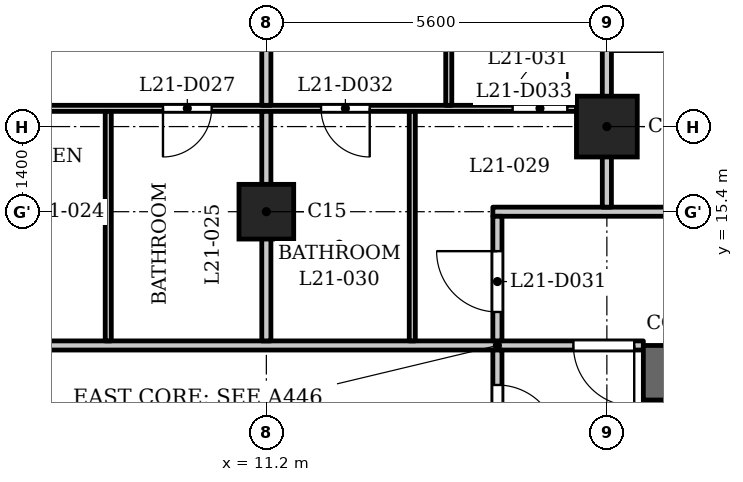
"""IFC4 building model, lengths in metres.
Left out: names, types, materials, properties, quantities, classifications, styles, units other than length and angle.
Written with IfcOpenShell. Run it as: python <this file> out.ifc"""

import sys

from ifc_helpers import new_model, si_unit, direction, frame, frame_2d, origin, origin_2d, place, context, subcontext, project, spatial, rectangle, extrude, element, fill, save


model = new_model("IFC4")
c1 = context("Model", 3, precision=1e-05, world=origin(), true_north=direction((0.0, 1.0)))
c2 = subcontext(c1, "Body", "Model", "MODEL_VIEW")
j1 = project(units=[si_unit("LENGTHUNIT", "METRE"), si_unit("PLANEANGLEUNIT", "RADIAN")], contexts=[c1])
p1 = place(None, origin())
s1 = spatial("IfcSite", under=j1, at=p1, CompositionType="ELEMENT")
p2 = place(p1, origin())
s2 = spatial("IfcBuilding", under=s1, at=p2, CompositionType="ELEMENT")
p3 = place(p2, frame((0.0, 0.0, 86.8)))
s3 = spatial("IfcBuildingStorey", under=s2, at=p3, CompositionType="ELEMENT", Elevation=86.8)
p4 = place(p3, frame((16.8, 16.8, 0.0), z_axis=(0.0, 0.0, 1.0), x_axis=(1.0, 0.0, 0.0)))
e1 = element("IfcColumn", 1, at=p4, inside=s3, PredefinedType="COLUMN", context=c2, shape_type="SweptSolid", body=[
    extrude(rectangle(XDim=1.0, YDim=1.0, at=origin_2d()), origin(), (0.0, 0.0, 1.0), 3.5),
])
p5 = place(p3, frame((11.2, 15.4, 0.0), z_axis=(0.0, 0.0, 1.0), x_axis=(1.0, 0.0, 0.0)))
e2 = element("IfcColumn", 2, at=p5, inside=s3, PredefinedType="COLUMN", context=c2, shape_type="SweptSolid", body=[
    extrude(rectangle(XDim=0.9, YDim=0.9, at=origin_2d()), origin(), (0.0, 0.0, 1.0), 3.5),
])
p6 = place(p3, frame((17.4, 12.75, 0.0), z_axis=(0.0, 0.0, 1.0), x_axis=(1.0, 0.0, 0.0)))
e3 = element("IfcWall", 3, at=p6, inside=s3, PredefinedType="SHEAR", context=c2, shape_type="SweptSolid", body=[
    extrude(rectangle(XDim=10.4, YDim=0.9, at=frame_2d((5.2, 0.0))), origin(), (0.0, 0.0, 1.0), 3.2),
])
p7 = place(p3, frame((17.6, -12.3, 0.0), z_axis=(0.0, 0.0, 1.0), x_axis=(0.0, 1.0, 0.0)))
e4 = element("IfcWall", 4, at=p7, inside=s3, PredefinedType="SHEAR", context=c2, shape_type="SweptSolid", body=[
    extrude(rectangle(XDim=24.6, YDim=0.4, at=frame_2d((12.3, 0.0))), origin(), (0.0, 0.0, 1.0), 3.2),
])
p8 = place(p7, frame((6.0, 0.0, 0.0)))
e5 = element("IfcOpeningElement", 5, at=p8, cuts=e4, PredefinedType="OPENING", context=c2, shape_type="SweptSolid", body=[
    extrude(rectangle(XDim=1.1, YDim=2.1, at=frame_2d((0.55, 1.05))), frame((0.0, 0.21, 0.0), z_axis=(0.0, -1.0, 0.0), x_axis=(1.0, 0.0, 0.0)), (0.0, 0.0, 1.0), 0.42),
])
p9 = place(p7, frame((8.4, 0.0, 0.0)))
e6 = element("IfcOpeningElement", 6, at=p9, cuts=e4, PredefinedType="OPENING", context=c2, shape_type="SweptSolid", body=[
    extrude(rectangle(XDim=1.1, YDim=2.1, at=frame_2d((0.55, 1.05))), frame((0.0, 0.21, 0.0), z_axis=(0.0, -1.0, 0.0), x_axis=(1.0, 0.0, 0.0)), (0.0, 0.0, 1.0), 0.42),
])
p10 = place(p7, frame((10.8, 0.0, 0.0)))
e7 = element("IfcOpeningElement", 7, at=p10, cuts=e4, PredefinedType="OPENING", context=c2, shape_type="SweptSolid", body=[
    extrude(rectangle(XDim=1.1, YDim=2.1, at=frame_2d((0.55, 1.05))), frame((0.0, 0.21, 0.0), z_axis=(0.0, -1.0, 0.0), x_axis=(1.0, 0.0, 0.0)), (0.0, 0.0, 1.0), 0.42),
])
p11 = place(p7, frame((16.75, 0.0, 0.0)))
e8 = element("IfcOpeningElement", 8, at=p11, cuts=e4, PredefinedType="OPENING", context=c2, shape_type="SweptSolid", body=[
    extrude(rectangle(XDim=0.9, YDim=2.1, at=frame_2d((0.45, 1.05))), frame((0.0, 0.21, 0.0), z_axis=(0.0, -1.0, 0.0), x_axis=(1.0, 0.0, 0.0)), (0.0, 0.0, 1.0), 0.42),
])
p12 = place(p7, frame((22.8, 0.0, 0.0)))
e9 = element("IfcOpeningElement", 9, at=p12, cuts=e4, PredefinedType="OPENING", context=c2, shape_type="SweptSolid", body=[
    extrude(rectangle(XDim=1.1, YDim=2.1, at=frame_2d((0.55, 1.05))), frame((0.0, 0.21, 0.0), z_axis=(0.0, -1.0, 0.0), x_axis=(1.0, 0.0, 0.0)), (0.0, 0.0, 1.0), 0.42),
])
p13 = place(p7, frame((0.7, 0.0, 0.0)))
e10 = element("IfcOpeningElement", 10, at=p13, cuts=e4, PredefinedType="OPENING", context=c2, shape_type="SweptSolid", body=[
    extrude(rectangle(XDim=1.1, YDim=2.1, at=frame_2d((0.55, 1.05))), frame((0.0, 0.21, 0.0), z_axis=(0.0, -1.0, 0.0), x_axis=(1.0, 0.0, 0.0)), (0.0, 0.0, 1.0), 0.42),
])
p14 = place(p7, frame((12.775, 0.0, 0.0)))
e11 = element("IfcOpeningElement", 11, at=p14, cuts=e4, PredefinedType="OPENING", context=c2, shape_type="SweptSolid", body=[
    extrude(rectangle(XDim=1.8, YDim=2.1, at=frame_2d((0.9, 1.05))), frame((0.0, 0.21, 0.0), z_axis=(0.0, -1.0, 0.0), x_axis=(1.0, 0.0, 0.0)), (0.0, 0.0, 1.0), 0.42),
])
p15 = place(p3, frame((-17.4, 13.2, 0.0), z_axis=(0.0, 0.0, 1.0), x_axis=(1.0, 0.0, 0.0)))
e12 = element("IfcWall", 12, at=p15, inside=s3, PredefinedType="PARTITIONING", context=c2, shape_type="SweptSolid", body=[
    extrude(rectangle(XDim=34.8, YDim=0.15, at=frame_2d((17.4, 0.0))), origin(), (0.0, 0.0, 1.0), 3.2),
])
p16 = place(p15, frame((0.25, 0.0, 0.0)))
e13 = element("IfcOpeningElement", 13, at=p16, cuts=e12, PredefinedType="OPENING", context=c2, shape_type="SweptSolid", body=[
    extrude(rectangle(XDim=1.0, YDim=2.1, at=frame_2d((0.5, 1.05))), frame((0.0, 0.085, 0.0), z_axis=(0.0, -1.0, 0.0), x_axis=(1.0, 0.0, 0.0)), (0.0, 0.0, 1.0), 0.17),
])
p17 = place(p15, frame((33.65, 0.0, 0.0)))
e14 = element("IfcOpeningElement", 14, at=p17, cuts=e12, PredefinedType="OPENING", context=c2, shape_type="SweptSolid", body=[
    extrude(rectangle(XDim=1.0, YDim=2.1, at=frame_2d((0.5, 1.05))), frame((0.0, 0.085, 0.0), z_axis=(0.0, -1.0, 0.0), x_axis=(1.0, 0.0, 0.0)), (0.0, 0.0, 1.0), 0.17),
])
p18 = place(p15, frame((15.75, 0.0, 0.0)))
e15 = element("IfcOpeningElement", 15, at=p18, cuts=e12, PredefinedType="OPENING", context=c2, shape_type="SweptSolid", body=[
    extrude(rectangle(XDim=1.0, YDim=2.1, at=frame_2d((0.5, 1.05))), frame((0.0, 0.085, 0.0), z_axis=(0.0, -1.0, 0.0), x_axis=(1.0, 0.0, 0.0)), (0.0, 0.0, 1.0), 0.17),
])
p19 = place(p15, frame((21.35, 0.0, 0.0)))
e16 = element("IfcOpeningElement", 16, at=p19, cuts=e12, PredefinedType="OPENING", context=c2, shape_type="SweptSolid", body=[
    extrude(rectangle(XDim=1.0, YDim=2.1, at=frame_2d((0.5, 1.05))), frame((0.0, 0.085, 0.0), z_axis=(0.0, -1.0, 0.0), x_axis=(1.0, 0.0, 0.0)), (0.0, 0.0, 1.0), 0.17),
])
p20 = place(p3, frame((14.925, 15.4, 0.0), z_axis=(0.0, 0.0, 1.0), x_axis=(1.0, 0.0, 0.0)))
e17 = element("IfcWall", 17, at=p20, inside=s3, PredefinedType="PARTITIONING", context=c2, shape_type="SweptSolid", body=[
    extrude(rectangle(XDim=12.559, YDim=0.15, at=frame_2d((6.279, 0.0))), origin(), (0.0, 0.0, 1.0), 3.2),
])
p21 = place(p20, frame((5.825, 0.0, 0.0)))
e18 = element("IfcOpeningElement", 18, at=p21, cuts=e17, PredefinedType="OPENING", context=c2, shape_type="SweptSolid", body=[
    extrude(rectangle(XDim=1.0, YDim=2.1, at=frame_2d((0.5, 1.05))), frame((0.0, 0.085, 0.0), z_axis=(0.0, -1.0, 0.0), x_axis=(1.0, 0.0, 0.0)), (0.0, 0.0, 1.0), 0.17),
])
p22 = place(p3, frame((-16.725, 17.1, 0.0), z_axis=(0.0, 0.0, 1.0), x_axis=(1.0, 0.0, 0.0)))
e19 = element("IfcWall", 19, at=p22, inside=s3, PredefinedType="PARTITIONING", context=c2, shape_type="SweptSolid", body=[
    extrude(rectangle(XDim=33.45, YDim=0.1, at=frame_2d((16.725, 0.0))), origin(), (0.0, 0.0, 1.0), 3.2),
])
p23 = place(p22, frame((3.925, 0.0, 0.0)))
e20 = element("IfcOpeningElement", 20, at=p23, cuts=e19, PredefinedType="OPENING", context=c2, shape_type="SweptSolid", body=[
    extrude(rectangle(XDim=0.8, YDim=2.1, at=frame_2d((0.4, 1.05))), frame((0.0, 0.06, 0.0), z_axis=(0.0, -1.0, 0.0), x_axis=(1.0, 0.0, 0.0)), (0.0, 0.0, 1.0), 0.12),
])
p24 = place(p22, frame((0.975, 0.0, 0.0)))
e21 = element("IfcOpeningElement", 21, at=p24, cuts=e19, PredefinedType="OPENING", context=c2, shape_type="SweptSolid", body=[
    extrude(rectangle(XDim=0.9, YDim=2.1, at=frame_2d((0.45, 1.05))), frame((0.0, 0.06, 0.0), z_axis=(0.0, -1.0, 0.0), x_axis=(1.0, 0.0, 0.0)), (0.0, 0.0, 1.0), 0.12),
])
p25 = place(p22, frame((6.425, 0.0, 0.0)))
e22 = element("IfcOpeningElement", 22, at=p25, cuts=e19, PredefinedType="OPENING", context=c2, shape_type="SweptSolid", body=[
    extrude(rectangle(XDim=0.8, YDim=2.1, at=frame_2d((0.4, 1.05))), frame((0.0, 0.06, 0.0), z_axis=(0.0, -1.0, 0.0), x_axis=(1.0, 0.0, 0.0)), (0.0, 0.0, 1.0), 0.12),
])
p26 = place(p22, frame((8.825, 0.0, 0.0)))
e23 = element("IfcOpeningElement", 23, at=p26, cuts=e19, PredefinedType="OPENING", context=c2, shape_type="SweptSolid", body=[
    extrude(rectangle(XDim=0.9, YDim=2.1, at=frame_2d((0.45, 1.05))), frame((0.0, 0.06, 0.0), z_axis=(0.0, -1.0, 0.0), x_axis=(1.0, 0.0, 0.0)), (0.0, 0.0, 1.0), 0.12),
])
p27 = place(p22, frame((12.375, 0.0, 0.0)))
e24 = element("IfcOpeningElement", 24, at=p27, cuts=e19, PredefinedType="OPENING", context=c2, shape_type="SweptSolid", body=[
    extrude(rectangle(XDim=0.9, YDim=2.1, at=frame_2d((0.45, 1.05))), frame((0.0, 0.06, 0.0), z_axis=(0.0, -1.0, 0.0), x_axis=(1.0, 0.0, 0.0)), (0.0, 0.0, 1.0), 0.12),
])
p28 = place(p22, frame((14.425, 0.0, 0.0)))
e25 = element("IfcOpeningElement", 25, at=p28, cuts=e19, PredefinedType="OPENING", context=c2, shape_type="SweptSolid", body=[
    extrude(rectangle(XDim=0.9, YDim=2.1, at=frame_2d((0.45, 1.05))), frame((0.0, 0.06, 0.0), z_axis=(0.0, -1.0, 0.0), x_axis=(1.0, 0.0, 0.0)), (0.0, 0.0, 1.0), 0.12),
])
p29 = place(p22, frame((26.225, 0.0, 0.0)))
e26 = element("IfcOpeningElement", 26, at=p29, cuts=e19, PredefinedType="OPENING", context=c2, shape_type="SweptSolid", body=[
    extrude(rectangle(XDim=0.8, YDim=2.1, at=frame_2d((0.4, 1.05))), frame((0.0, 0.06, 0.0), z_axis=(0.0, -1.0, 0.0), x_axis=(1.0, 0.0, 0.0)), (0.0, 0.0, 1.0), 0.12),
])
p30 = place(p22, frame((23.025, 0.0, 0.0)))
e27 = element("IfcOpeningElement", 27, at=p30, cuts=e19, PredefinedType="OPENING", context=c2, shape_type="SweptSolid", body=[
    extrude(rectangle(XDim=0.9, YDim=2.1, at=frame_2d((0.45, 1.05))), frame((0.0, 0.06, 0.0), z_axis=(0.0, -1.0, 0.0), x_axis=(1.0, 0.0, 0.0)), (0.0, 0.0, 1.0), 0.12),
])
p31 = place(p22, frame((17.775, 0.0, 0.0)))
e28 = element("IfcOpeningElement", 28, at=p31, cuts=e19, PredefinedType="OPENING", context=c2, shape_type="SweptSolid", body=[
    extrude(rectangle(XDim=0.9, YDim=2.1, at=frame_2d((0.45, 1.05))), frame((0.0, 0.06, 0.0), z_axis=(0.0, -1.0, 0.0), x_axis=(1.0, 0.0, 0.0)), (0.0, 0.0, 1.0), 0.12),
])
p32 = place(p22, frame((20.025, 0.0, 0.0)))
e29 = element("IfcOpeningElement", 29, at=p32, cuts=e19, PredefinedType="OPENING", context=c2, shape_type="SweptSolid", body=[
    extrude(rectangle(XDim=0.9, YDim=2.1, at=frame_2d((0.45, 1.05))), frame((0.0, 0.06, 0.0), z_axis=(0.0, -1.0, 0.0), x_axis=(1.0, 0.0, 0.0)), (0.0, 0.0, 1.0), 0.12),
])
p33 = place(p22, frame((28.825, 0.0, 0.0)))
e30 = element("IfcOpeningElement", 30, at=p33, cuts=e19, PredefinedType="OPENING", context=c2, shape_type="SweptSolid", body=[
    extrude(rectangle(XDim=0.8, YDim=2.1, at=frame_2d((0.4, 1.05))), frame((0.0, 0.06, 0.0), z_axis=(0.0, -1.0, 0.0), x_axis=(1.0, 0.0, 0.0)), (0.0, 0.0, 1.0), 0.12),
])
p34 = place(p22, frame((31.975, 0.0, 0.0)))
e31 = element("IfcOpeningElement", 31, at=p34, cuts=e19, PredefinedType="OPENING", context=c2, shape_type="SweptSolid", body=[
    extrude(rectangle(XDim=0.9, YDim=2.1, at=frame_2d((0.45, 1.05))), frame((0.0, 0.06, 0.0), z_axis=(0.0, -1.0, 0.0), x_axis=(1.0, 0.0, 0.0)), (0.0, 0.0, 1.0), 0.12),
])
p35 = place(p3, frame((8.6, 13.275, 0.0), z_axis=(0.0, 0.0, 1.0), x_axis=(0.0, 1.0, 0.0)))
e32 = element("IfcWall", 32, at=p35, inside=s3, PredefinedType="PARTITIONING", context=c2, shape_type="SweptSolid", body=[
    extrude(rectangle(XDim=3.775, YDim=0.1, at=frame_2d((1.888, 0.0))), origin(), (0.0, 0.0, 1.0), 3.2),
])
p36 = place(p3, frame((11.2, 13.275, 0.0), z_axis=(0.0, 0.0, 1.0), x_axis=(0.0, 1.0, 0.0)))
e33 = element("IfcWall", 33, at=p36, inside=s3, PredefinedType="PARTITIONING", context=c2, shape_type="SweptSolid", body=[
    extrude(rectangle(XDim=3.775, YDim=0.15, at=frame_2d((1.888, 0.0))), origin(), (0.0, 0.0, 1.0), 3.2),
])
p37 = place(p3, frame((11.2, 17.15, 0.0), z_axis=(0.0, 0.0, 1.0), x_axis=(0.0, 1.0, 0.0)))
e34 = element("IfcWall", 34, at=p37, inside=s3, PredefinedType="PARTITIONING", context=c2, shape_type="SweptSolid", body=[
    extrude(rectangle(XDim=5.88, YDim=0.15, at=frame_2d((2.94, 0.0))), origin(), (0.0, 0.0, 1.0), 3.2),
])
p38 = place(p3, frame((13.6, 13.275, 0.0), z_axis=(0.0, 0.0, 1.0), x_axis=(0.0, 1.0, 0.0)))
e35 = element("IfcWall", 35, at=p38, inside=s3, PredefinedType="PARTITIONING", context=c2, shape_type="SweptSolid", body=[
    extrude(rectangle(XDim=3.775, YDim=0.1, at=frame_2d((1.888, 0.0))), origin(), (0.0, 0.0, 1.0), 3.2),
])
p39 = place(p3, frame((14.2, 17.15, 0.0), z_axis=(0.0, 0.0, 1.0), x_axis=(0.0, 1.0, 0.0)))
e36 = element("IfcWall", 36, at=p39, inside=s3, PredefinedType="PARTITIONING", context=c2, shape_type="SweptSolid", body=[
    extrude(rectangle(XDim=4.93, YDim=0.1, at=frame_2d((2.465, 0.0))), origin(), (0.0, 0.0, 1.0), 3.2),
])
p40 = place(p39, frame((1.36, 0.0, 0.0)))
e37 = element("IfcOpeningElement", 37, at=p40, cuts=e36, PredefinedType="OPENING", context=c2, shape_type="SweptSolid", body=[
    extrude(rectangle(XDim=0.9, YDim=2.1, at=frame_2d((0.45, 1.05))), frame((0.0, 0.06, 0.0), z_axis=(0.0, -1.0, 0.0), x_axis=(1.0, 0.0, 0.0)), (0.0, 0.0, 1.0), 0.12),
])
p41 = place(p3, frame((15.0, 6.769, 0.0), z_axis=(0.0, 0.0, 1.0), x_axis=(0.0, 1.0, 0.0)))
e38 = element("IfcWall", 38, at=p41, inside=s3, PredefinedType="PARTITIONING", context=c2, shape_type="SweptSolid", body=[
    extrude(rectangle(XDim=6.356, YDim=0.15, at=frame_2d((3.178, 0.0))), origin(), (0.0, 0.0, 1.0), 3.2),
])
p42 = place(p41, frame((4.781, 0.0, 0.0)))
e39 = element("IfcOpeningElement", 39, at=p42, cuts=e38, PredefinedType="OPENING", context=c2, shape_type="SweptSolid", body=[
    extrude(rectangle(XDim=1.0, YDim=2.1, at=frame_2d((0.5, 1.05))), frame((0.0, 0.085, 0.0), z_axis=(0.0, -1.0, 0.0), x_axis=(1.0, 0.0, 0.0)), (0.0, 0.0, 1.0), 0.17),
])
p43 = place(p3, frame((15.0, 13.275, 0.0), z_axis=(0.0, 0.0, 1.0), x_axis=(0.0, 1.0, 0.0)))
e40 = element("IfcWall", 40, at=p43, inside=s3, PredefinedType="PARTITIONING", context=c2, shape_type="SweptSolid", body=[
    extrude(rectangle(XDim=2.05, YDim=0.15, at=frame_2d((1.025, 0.0))), origin(), (0.0, 0.0, 1.0), 3.2),
])
p44 = place(p43, frame((0.476, 0.0, 0.0)))
e41 = element("IfcOpeningElement", 41, at=p44, cuts=e40, PredefinedType="OPENING", context=c2, shape_type="SweptSolid", body=[
    extrude(rectangle(XDim=1.0, YDim=2.1, at=frame_2d((0.5, 1.05))), frame((0.0, 0.085, 0.0), z_axis=(0.0, -1.0, 0.0), x_axis=(1.0, 0.0, 0.0)), (0.0, 0.0, 1.0), 0.17),
])
p45 = place(p3, frame((16.8, 15.475, 0.0), z_axis=(0.0, 0.0, 1.0), x_axis=(0.0, 1.0, 0.0)))
e42 = element("IfcWall", 42, at=p45, inside=s3, PredefinedType="PARTITIONING", context=c2, shape_type="SweptSolid", body=[
    extrude(rectangle(XDim=7.555, YDim=0.15, at=frame_2d((3.777, 0.0))), origin(), (0.0, 0.0, 1.0), 3.2),
])
p46 = place(p42, origin())
e43 = element("IfcDoor", 43, at=p46, inside=s3, OperationType="SINGLE_SWING_LEFT", PredefinedType="DOOR", context=c2, shape_type="SweptSolid", body=[
    extrude(rectangle(XDim=1.0, YDim=2.1, at=frame_2d((0.5, 1.05))), frame((0.0, 0.025, 0.0), z_axis=(0.0, -1.0, 0.0), x_axis=(1.0, 0.0, 0.0)), (0.0, 0.0, 1.0), 0.05),
])
fill(e39, e43)
p47 = place(p17, origin())
e44 = element("IfcDoor", 44, at=p47, inside=s3, OperationType="SINGLE_SWING_RIGHT", PredefinedType="DOOR", context=c2, shape_type="SweptSolid", body=[
    extrude(rectangle(XDim=1.0, YDim=2.1, at=frame_2d((0.5, 1.05))), frame((0.0, 0.025, 0.0), z_axis=(0.0, -1.0, 0.0), x_axis=(1.0, 0.0, 0.0)), (0.0, 0.0, 1.0), 0.05),
])
fill(e14, e44)
p48 = place(p29, origin())
e45 = element("IfcDoor", 45, at=p48, inside=s3, OperationType="SINGLE_SWING_LEFT", PredefinedType="DOOR", context=c2, shape_type="SweptSolid", body=[
    extrude(rectangle(XDim=0.8, YDim=2.1, at=frame_2d((0.4, 1.05))), frame((0.0, 0.025, 0.0), z_axis=(0.0, -1.0, 0.0), x_axis=(1.0, 0.0, 0.0)), (0.0, 0.0, 1.0), 0.05),
])
fill(e26, e45)
p49 = place(p44, origin())
e46 = element("IfcDoor", 46, at=p49, inside=s3, OperationType="SINGLE_SWING_LEFT", PredefinedType="DOOR", context=c2, shape_type="SweptSolid", body=[
    extrude(rectangle(XDim=1.0, YDim=2.1, at=frame_2d((0.5, 1.05))), frame((0.0, 0.025, 0.0), z_axis=(0.0, -1.0, 0.0), x_axis=(1.0, 0.0, 0.0)), (0.0, 0.0, 1.0), 0.05),
])
fill(e41, e46)
p50 = place(p33, origin())
e47 = element("IfcDoor", 47, at=p50, inside=s3, OperationType="SINGLE_SWING_RIGHT", PredefinedType="DOOR", context=c2, shape_type="SweptSolid", body=[
    extrude(rectangle(XDim=0.8, YDim=2.1, at=frame_2d((0.4, 1.05))), frame((0.0, 0.025, 0.0), z_axis=(0.0, -1.0, 0.0), x_axis=(1.0, 0.0, 0.0)), (0.0, 0.0, 1.0), 0.05),
])
fill(e30, e47)
p51 = place(p34, origin())
e48 = element("IfcDoor", 48, at=p51, inside=s3, OperationType="SINGLE_SWING_LEFT", PredefinedType="DOOR", context=c2, shape_type="SweptSolid", body=[
    extrude(rectangle(XDim=0.9, YDim=2.1, at=frame_2d((0.45, 1.05))), frame((0.0, 0.025, 0.0), z_axis=(0.0, -1.0, 0.0), x_axis=(1.0, 0.0, 0.0)), (0.0, 0.0, 1.0), 0.05),
])
fill(e31, e48)
save(model, sys.argv[1])
